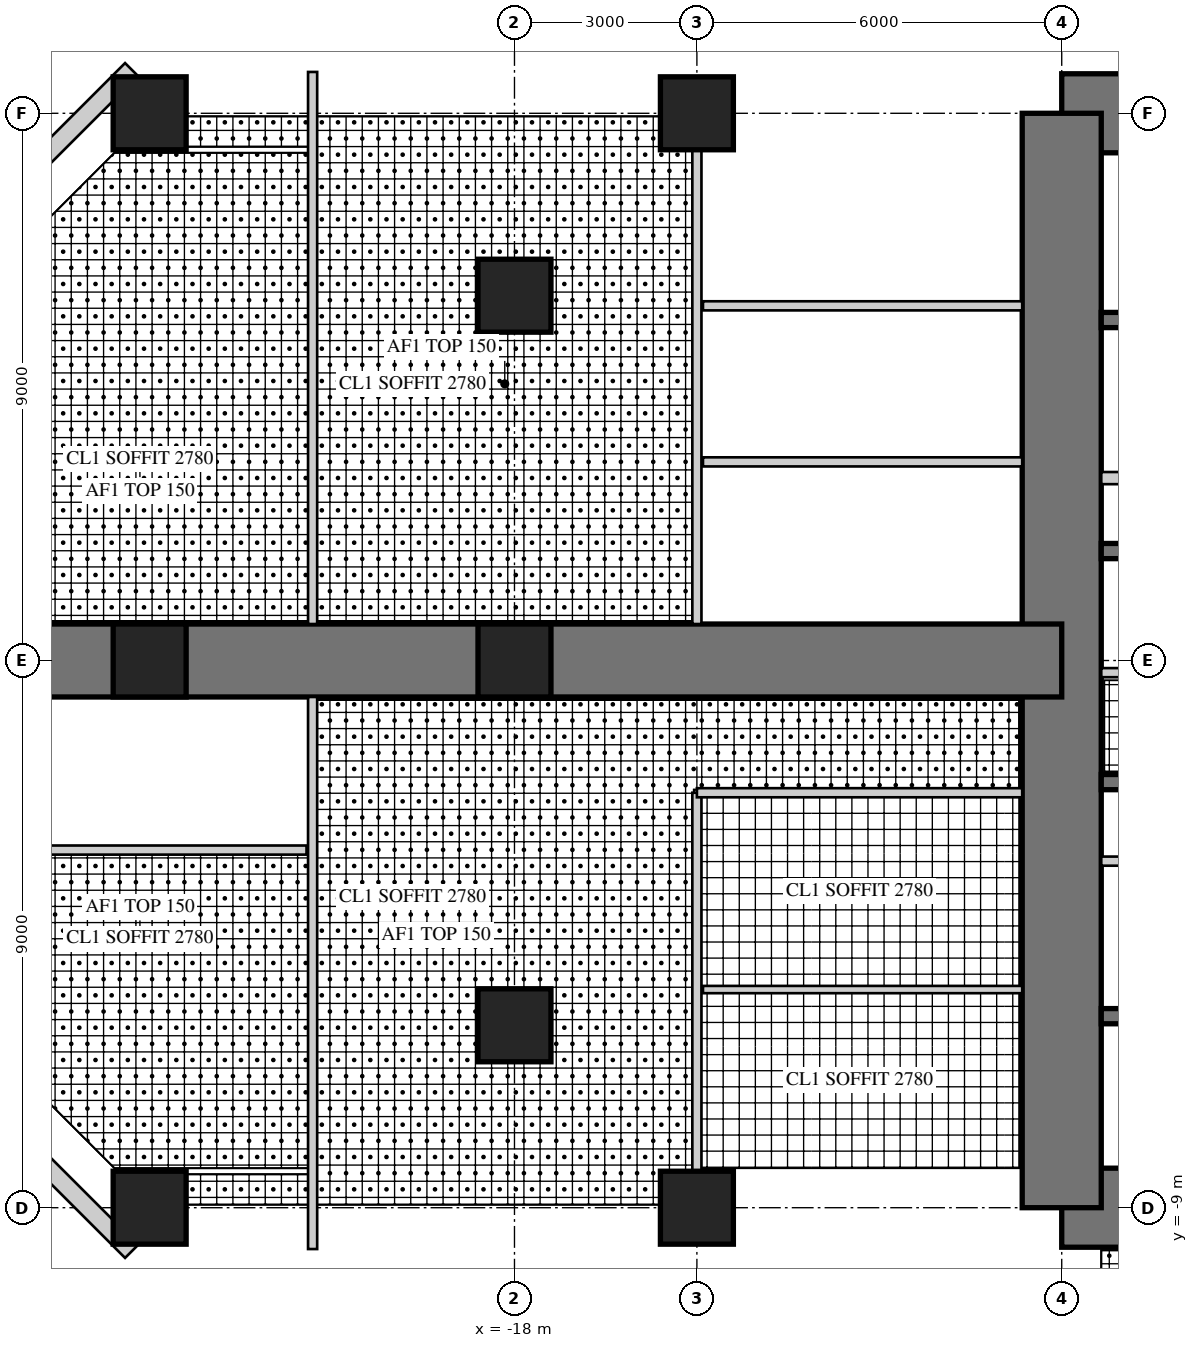
"""IFC4 building model, lengths in metres.
Left out: names, types, materials, properties, quantities, classifications, styles, units other than length and angle.
Written with IfcOpenShell. Run it as: python <this file> out.ifc"""

import sys

from ifc_helpers import new_model, si_unit, direction, frame, frame_2d, origin, origin_2d, place, context, subcontext, project, spatial, rectangle, extrude, element, fill, save


model = new_model("IFC4")
c1 = context("Model", 3, precision=1e-05, world=origin(), true_north=direction((0.0, 1.0)))
c2 = subcontext(c1, "Body", "Model", "MODEL_VIEW")
j1 = project(units=[si_unit("LENGTHUNIT", "METRE"), si_unit("PLANEANGLEUNIT", "RADIAN")], contexts=[c1])
p1 = place(None, origin())
s1 = spatial("IfcSite", under=j1, at=p1, CompositionType="ELEMENT")
p2 = place(p1, origin())
s2 = spatial("IfcBuilding", under=s1, at=p2, CompositionType="ELEMENT")
p3 = place(p2, frame((0.0, 0.0, 47.5)))
s3 = spatial("IfcBuildingStorey", under=s2, at=p3, CompositionType="ELEMENT", Elevation=47.5)
p4 = place(p3, frame((9.0, 9.0, 0.0), z_axis=(0.0, 0.0, 1.0), x_axis=(-1.0, 0.0, 0.0)))
e1 = element("IfcWall", 1, at=p4, inside=s3, PredefinedType="SHEAR", context=c2, shape_type="SweptSolid", body=[
    extrude(rectangle(XDim=18.0, YDim=1.3, at=frame_2d((9.0, 0.0))), origin(), (0.0, 0.0, 1.0), 4.0),
])
p5 = place(p4, frame((9.8, 0.0, 0.0)))
e2 = element("IfcOpeningElement", 2, at=p5, cuts=e1, PredefinedType="OPENING", context=c2, shape_type="SweptSolid", body=[
    extrude(rectangle(XDim=1.0, YDim=2.4, at=frame_2d((0.5, 1.2))), frame((0.0, 0.66, 0.0), z_axis=(0.0, -1.0, 0.0), x_axis=(1.0, 0.0, 0.0)), (0.0, 0.0, 1.0), 1.32),
])
p6 = place(p3, frame((-9.0, -9.0, 0.0), z_axis=(0.0, 0.0, 1.0), x_axis=(1.0, 0.0, 0.0)))
e3 = element("IfcWall", 3, at=p6, inside=s3, PredefinedType="SHEAR", context=c2, shape_type="SweptSolid", body=[
    extrude(rectangle(XDim=18.0, YDim=1.3, at=frame_2d((9.0, 0.0))), origin(), (0.0, 0.0, 1.0), 4.0),
])
p7 = place(p6, frame((9.8, 0.0, 0.0)))
e4 = element("IfcOpeningElement", 4, at=p7, cuts=e3, PredefinedType="OPENING", context=c2, shape_type="SweptSolid", body=[
    extrude(rectangle(XDim=1.0, YDim=2.4, at=frame_2d((0.5, 1.2))), frame((0.0, 0.66, 0.0), z_axis=(0.0, -1.0, 0.0), x_axis=(1.0, 0.0, 0.0)), (0.0, 0.0, 1.0), 1.32),
])
p8 = place(p3, frame((-9.0, 9.0, 0.0), z_axis=(0.0, 0.0, 1.0), x_axis=(0.0, -1.0, 0.0)))
e5 = element("IfcWall", 5, at=p8, inside=s3, PredefinedType="SHEAR", context=c2, shape_type="SweptSolid", body=[
    extrude(rectangle(XDim=18.0, YDim=1.3, at=frame_2d((9.0, 0.0))), origin(), (0.0, 0.0, 1.0), 4.0),
])
p9 = place(p8, frame((9.8, 0.0, 0.0)))
e6 = element("IfcOpeningElement", 6, at=p9, cuts=e5, PredefinedType="OPENING", context=c2, shape_type="SweptSolid", body=[
    extrude(rectangle(XDim=1.0, YDim=2.4, at=frame_2d((0.5, 1.2))), frame((0.0, 0.66, 0.0), z_axis=(0.0, -1.0, 0.0), x_axis=(1.0, 0.0, 0.0)), (0.0, 0.0, 1.0), 1.32),
])
p10 = place(p3, frame((-2.125, 1.8, 0.0), z_axis=(0.0, 0.0, 1.0), x_axis=(-1.0, 0.0, 0.0)))
e7 = element("IfcWall", 7, at=p10, inside=s3, PredefinedType="SHEAR", context=c2, shape_type="SweptSolid", body=[
    extrude(rectangle(XDim=6.225, YDim=0.25, at=frame_2d((3.113, 0.0))), origin(), (0.0, 0.0, 1.0), 4.0),
])
p11 = place(p3, frame((-2.125, 5.6, 0.0), z_axis=(0.0, 0.0, 1.0), x_axis=(-1.0, 0.0, 0.0)))
e8 = element("IfcWall", 8, at=p11, inside=s3, PredefinedType="SHEAR", context=c2, shape_type="SweptSolid", body=[
    extrude(rectangle(XDim=6.225, YDim=0.25, at=frame_2d((3.113, 0.0))), origin(), (0.0, 0.0, 1.0), 4.0),
])
p12 = place(p11, frame((0.175, 0.0, 0.0)))
e9 = element("IfcOpeningElement", 9, at=p12, cuts=e8, PredefinedType="OPENING", context=c2, shape_type="SweptSolid", body=[
    extrude(rectangle(XDim=1.0, YDim=2.1, at=frame_2d((0.5, 1.05))), frame((0.0, 0.135, 0.0), z_axis=(0.0, -1.0, 0.0), x_axis=(1.0, 0.0, 0.0)), (0.0, 0.0, 1.0), 0.27),
])
p13 = place(p3, frame((-5.725, 3.0, 0.0), z_axis=(0.0, 0.0, 1.0), x_axis=(-1.0, 0.0, 0.0)))
e10 = element("IfcWall", 10, at=p13, inside=s3, PredefinedType="PARTITIONING", context=c2, shape_type="SweptSolid", body=[
    extrude(rectangle(XDim=2.625, YDim=0.2, at=frame_2d((1.312, 0.0))), origin(), (0.0, 0.0, 1.0), 4.0),
])
for number, where, z_axis, x_axis in (
    (11, (-1.925, -2.0, 0.0), (0.0, 0.0, 1.0), (-1.0, 0.0, 0.0)),
    (12, (-1.925, -5.85, 0.0), (0.0, 0.0, 1.0), (-1.0, 0.0, 0.0)),
):
    element("IfcWall", number, at=place(p3, frame(where, z_axis=z_axis, x_axis=x_axis)), inside=s3, PredefinedType="SHEAR", context=c2, shape_type="SweptSolid", body=[
        extrude(rectangle(XDim=6.425, YDim=0.25, at=frame_2d((3.212, 0.0))), origin(), (0.0, 0.0, 1.0), 4.0),
    ])
p14 = place(p3, frame((-1.925, -3.3, 0.0), z_axis=(0.0, 0.0, 1.0), x_axis=(-1.0, 0.0, 0.0)))
e13 = element("IfcWall", 13, at=p14, inside=s3, PredefinedType="PARTITIONING", context=c2, shape_type="SweptSolid", body=[
    extrude(rectangle(XDim=6.425, YDim=0.15, at=frame_2d((3.212, 0.0))), origin(), (0.0, 0.0, 1.0), 4.0),
])
p15 = place(p14, frame((0.075, 0.0, 0.0)))
e14 = element("IfcOpeningElement", 14, at=p15, cuts=e13, PredefinedType="OPENING", context=c2, shape_type="SweptSolid", body=[
    extrude(rectangle(XDim=0.8, YDim=2.1, at=frame_2d((0.4, 1.05))), frame((0.0, 0.085, 0.0), z_axis=(0.0, -1.0, 0.0), x_axis=(1.0, 0.0, 0.0)), (0.0, 0.0, 1.0), 0.17),
])
p16 = place(p14, frame((3.675, 0.0, 0.0)))
e15 = element("IfcOpeningElement", 15, at=p16, cuts=e13, PredefinedType="OPENING", context=c2, shape_type="SweptSolid", body=[
    extrude(rectangle(XDim=0.8, YDim=2.1, at=frame_2d((0.4, 1.05))), frame((0.0, 0.085, 0.0), z_axis=(0.0, -1.0, 0.0), x_axis=(1.0, 0.0, 0.0)), (0.0, 0.0, 1.0), 0.17),
])
p17 = place(p3, frame((-9.0, 0.0, 0.0), z_axis=(0.0, 0.0, 1.0), x_axis=(-1.0, 0.0, 0.0)))
e16 = element("IfcWall", 16, at=p17, inside=s3, PredefinedType="SHEAR", context=c2, shape_type="SweptSolid", body=[
    extrude(rectangle(XDim=18.0, YDim=1.2, at=frame_2d((9.0, 0.0))), origin(), (0.0, 0.0, 1.0), 4.0),
])
p18 = place(p17, frame((9.9, 0.0, 0.0)))
e17 = element("IfcOpeningElement", 17, at=p18, cuts=e16, PredefinedType="OPENING", context=c2, shape_type="SweptSolid", body=[
    extrude(rectangle(XDim=1.0, YDim=2.2, at=frame_2d((0.5, 1.1))), frame((0.0, 0.61, 0.0), z_axis=(0.0, -1.0, 0.0), x_axis=(1.0, 0.0, 0.0)), (0.0, 0.0, 1.0), 1.22),
])
for number, where, z_axis, x_axis in (
    (18, (-15.0, 9.0, 0.0), (0.0, 0.0, 1.0), (1.0, 0.0, 0.0)),
    (19, (-24.0, 9.0, 0.0), (0.0, 0.0, 1.0), (1.0, 0.0, 0.0)),
    (20, (-15.0, -9.0, 0.0), (0.0, 0.0, 1.0), (1.0, 0.0, 0.0)),
    (21, (-24.0, -9.0, 0.0), (0.0, 0.0, 1.0), (1.0, 0.0, 0.0)),
    (22, (-18.0, 6.0, 0.0), (0.0, 0.0, 1.0), (1.0, 0.0, 0.0)),
    (23, (-18.0, 0.0, 0.0), (0.0, 0.0, 1.0), (1.0, 0.0, 0.0)),
    (24, (-18.0, -6.0, 0.0), (0.0, 0.0, 1.0), (1.0, 0.0, 0.0)),
    (25, (-24.0, 0.0, 0.0), (0.0, 0.0, 1.0), (1.0, 0.0, 0.0)),
):
    element("IfcColumn", number, at=place(p3, frame(where, z_axis=z_axis, x_axis=x_axis)), inside=s3, PredefinedType="COLUMN", context=c2, shape_type="SweptSolid", body=[
        extrude(rectangle(XDim=1.2, YDim=1.2, at=origin_2d()), origin(), (0.0, 0.0, 1.0), 4.0),
    ])
p19 = place(p3, frame((-24.298, 9.72, 0.0), z_axis=(0.0, 0.0, 1.0), x_axis=(-0.707106781187, -0.707106781187, 0.0)))
e26 = element("IfcWall", 26, at=p19, inside=s3, PredefinedType="SOLIDWALL", context=c2, shape_type="SweptSolid", body=[
    extrude(rectangle(XDim=4.669, YDim=0.3, at=frame_2d((2.335, 0.0))), origin(), (0.0, 0.0, 1.0), 3.8),
])
p20 = place(p19, frame((1.885, 0.0, 0.3)))
e27 = element("IfcOpeningElement", 27, at=p20, cuts=e26, PredefinedType="OPENING", context=c2, shape_type="SweptSolid", body=[
    extrude(rectangle(XDim=0.9, YDim=2.4, at=frame_2d((0.45, 1.2))), frame((0.0, 0.16, 0.0), z_axis=(0.0, -1.0, 0.0), x_axis=(1.0, 0.0, 0.0)), (0.0, 0.0, 1.0), 0.32),
])
p21 = place(p3, frame((-27.6, -6.418, 0.0), z_axis=(0.0, 0.0, 1.0), x_axis=(0.707106781187, -0.707106781187, 0.0)))
e28 = element("IfcWall", 28, at=p21, inside=s3, PredefinedType="SOLIDWALL", context=c2, shape_type="SweptSolid", body=[
    extrude(rectangle(XDim=4.669, YDim=0.3, at=frame_2d((2.335, 0.0))), origin(), (0.0, 0.0, 1.0), 3.8),
])
p22 = place(p21, frame((1.885, 0.0, 0.3)))
e29 = element("IfcOpeningElement", 29, at=p22, cuts=e28, PredefinedType="OPENING", context=c2, shape_type="SweptSolid", body=[
    extrude(rectangle(XDim=0.9, YDim=2.4, at=frame_2d((0.45, 1.2))), frame((0.0, 0.16, 0.0), z_axis=(0.0, -1.0, 0.0), x_axis=(1.0, 0.0, 0.0)), (0.0, 0.0, 1.0), 0.32),
])
p23 = place(p3, frame((-2.325, -0.2, 0.0), z_axis=(0.0, 0.0, 1.0), x_axis=(-1.0, 0.0, 0.0)))
e30 = element("IfcWall", 30, at=p23, inside=s3, PredefinedType="PARTITIONING", context=c2, shape_type="SweptSolid", body=[
    extrude(rectangle(XDim=6.025, YDim=0.15, at=frame_2d((3.013, 0.0))), origin(), (0.0, 0.0, 1.0), 3.8),
])
p24 = place(p23, frame((0.4, 0.0, 0.0)))
e31 = element("IfcOpeningElement", 31, at=p24, cuts=e30, PredefinedType="OPENING", context=c2, shape_type="SweptSolid", body=[
    extrude(rectangle(XDim=1.0, YDim=2.1, at=frame_2d((0.5, 1.05))), frame((0.0, 0.085, 0.0), z_axis=(0.0, -1.0, 0.0), x_axis=(1.0, 0.0, 0.0)), (0.0, 0.0, 1.0), 0.17),
])
p25 = place(p3, frame((-15.0, -2.175, 0.0), z_axis=(0.0, 0.0, 1.0), x_axis=(0.0, -1.0, 0.0)))
e32 = element("IfcWall", 32, at=p25, inside=s3, PredefinedType="PARTITIONING", context=c2, shape_type="SweptSolid", body=[
    extrude(rectangle(XDim=6.225, YDim=0.15, at=frame_2d((3.112, 0.0))), origin(), (0.0, 0.0, 1.0), 2.95),
])
p26 = place(p25, frame((1.118, 0.0, 0.0)))
e33 = element("IfcOpeningElement", 33, at=p26, cuts=e32, PredefinedType="OPENING", context=c2, shape_type="SweptSolid", body=[
    extrude(rectangle(XDim=1.0, YDim=2.1, at=frame_2d((0.5, 1.05))), frame((0.0, 0.085, 0.0), z_axis=(0.0, -1.0, 0.0), x_axis=(1.0, 0.0, 0.0)), (0.0, 0.0, 1.0), 0.17),
])
p27 = place(p25, frame((4.231, 0.0, 0.0)))
e34 = element("IfcOpeningElement", 34, at=p27, cuts=e32, PredefinedType="OPENING", context=c2, shape_type="SweptSolid", body=[
    extrude(rectangle(XDim=1.0, YDim=2.1, at=frame_2d((0.5, 1.05))), frame((0.0, 0.085, 0.0), z_axis=(0.0, -1.0, 0.0), x_axis=(1.0, 0.0, 0.0)), (0.0, 0.0, 1.0), 0.17),
])
p28 = place(p3, frame((-9.65, -2.175, 0.0), z_axis=(0.0, 0.0, 1.0), x_axis=(-1.0, 0.0, 0.0)))
e35 = element("IfcWall", 35, at=p28, inside=s3, PredefinedType="PARTITIONING", context=c2, shape_type="SweptSolid", body=[
    extrude(rectangle(XDim=5.35, YDim=0.15, at=frame_2d((2.675, 0.0))), origin(), (0.0, 0.0, 1.0), 3.8),
])
p29 = place(p3, frame((-9.65, -5.412, 0.0), z_axis=(0.0, 0.0, 1.0), x_axis=(-1.0, 0.0, 0.0)))
e36 = element("IfcWall", 36, at=p29, inside=s3, PredefinedType="PLUMBINGWALL", context=c2, shape_type="SweptSolid", body=[
    extrude(rectangle(XDim=5.25, YDim=0.12, at=frame_2d((2.625, 0.0))), origin(), (0.0, 0.0, 1.0), 3.8),
])
p30 = place(p3, frame((-15.0, 8.4, 0.0), z_axis=(0.0, 0.0, 1.0), x_axis=(0.0, -1.0, 0.0)))
e37 = element("IfcWall", 37, at=p30, inside=s3, PredefinedType="PARTITIONING", context=c2, shape_type="SweptSolid", body=[
    extrude(rectangle(XDim=7.8, YDim=0.15, at=frame_2d((3.9, 0.0))), origin(), (0.0, 0.0, 1.0), 2.95),
])
p31 = place(p30, frame((0.783, 0.0, 0.0)))
e38 = element("IfcOpeningElement", 38, at=p31, cuts=e37, PredefinedType="OPENING", context=c2, shape_type="SweptSolid", body=[
    extrude(rectangle(XDim=1.0, YDim=2.1, at=frame_2d((0.5, 1.05))), frame((0.0, 0.085, 0.0), z_axis=(0.0, -1.0, 0.0), x_axis=(1.0, 0.0, 0.0)), (0.0, 0.0, 1.0), 0.17),
])
p32 = place(p30, frame((3.35, 0.0, 0.0)))
e39 = element("IfcOpeningElement", 39, at=p32, cuts=e37, PredefinedType="OPENING", context=c2, shape_type="SweptSolid", body=[
    extrude(rectangle(XDim=1.0, YDim=2.1, at=frame_2d((0.5, 1.05))), frame((0.0, 0.085, 0.0), z_axis=(0.0, -1.0, 0.0), x_axis=(1.0, 0.0, 0.0)), (0.0, 0.0, 1.0), 0.17),
])
p33 = place(p30, frame((5.967, 0.0, 0.0)))
e40 = element("IfcOpeningElement", 40, at=p33, cuts=e37, PredefinedType="OPENING", context=c2, shape_type="SweptSolid", body=[
    extrude(rectangle(XDim=1.0, YDim=2.1, at=frame_2d((0.5, 1.05))), frame((0.0, 0.085, 0.0), z_axis=(0.0, -1.0, 0.0), x_axis=(1.0, 0.0, 0.0)), (0.0, 0.0, 1.0), 0.17),
])
p34 = place(p3, frame((-9.65, 3.267, 0.0), z_axis=(0.0, 0.0, 1.0), x_axis=(-1.0, 0.0, 0.0)))
e41 = element("IfcWall", 41, at=p34, inside=s3, PredefinedType="PARTITIONING", context=c2, shape_type="SweptSolid", body=[
    extrude(rectangle(XDim=5.25, YDim=0.15, at=frame_2d((2.625, 0.0))), origin(), (0.0, 0.0, 1.0), 3.8),
])
p35 = place(p3, frame((-9.65, 5.833, 0.0), z_axis=(0.0, 0.0, 1.0), x_axis=(-1.0, 0.0, 0.0)))
e42 = element("IfcWall", 42, at=p35, inside=s3, PredefinedType="PARTITIONING", context=c2, shape_type="SweptSolid", body=[
    extrude(rectangle(XDim=5.25, YDim=0.15, at=frame_2d((2.625, 0.0))), origin(), (0.0, 0.0, 1.0), 3.0),
])
p36 = place(p3, frame((-21.42, -3.118, 0.0), z_axis=(0.0, 0.0, 1.0), x_axis=(-1.0, 0.0, 0.0)))
e43 = element("IfcWall", 43, at=p36, inside=s3, PredefinedType="PARTITIONING", context=c2, shape_type="SweptSolid", body=[
    extrude(rectangle(XDim=4.98, YDim=0.15, at=frame_2d((2.49, 0.0))), origin(), (0.0, 0.0, 1.0), 3.8),
])
p37 = place(p3, frame((-21.32, -0.6, 0.0), z_axis=(0.0, 0.0, 1.0), x_axis=(0.0, -1.0, 0.0)))
e44 = element("IfcWall", 44, at=p37, inside=s3, PredefinedType="PARTITIONING", context=c2, shape_type="SweptSolid", body=[
    extrude(rectangle(XDim=9.08, YDim=0.15, at=frame_2d((4.54, 0.0))), origin(), (0.0, 0.0, 1.0), 3.8),
])
p38 = place(p37, frame((0.35, 0.0, 0.0)))
e45 = element("IfcOpeningElement", 45, at=p38, cuts=e44, PredefinedType="OPENING", context=c2, shape_type="SweptSolid", body=[
    extrude(rectangle(XDim=1.0, YDim=2.2, at=frame_2d((0.5, 1.1))), frame((0.0, 0.085, 0.0), z_axis=(0.0, -1.0, 0.0), x_axis=(1.0, 0.0, 0.0)), (0.0, 0.0, 1.0), 0.17),
])
p39 = place(p37, frame((2.993, 0.0, 0.0)))
e46 = element("IfcOpeningElement", 46, at=p39, cuts=e44, PredefinedType="OPENING", context=c2, shape_type="SweptSolid", body=[
    extrude(rectangle(XDim=1.0, YDim=2.2, at=frame_2d((0.5, 1.1))), frame((0.0, 0.085, 0.0), z_axis=(0.0, -1.0, 0.0), x_axis=(1.0, 0.0, 0.0)), (0.0, 0.0, 1.0), 0.17),
])
p40 = place(p3, frame((-21.32, 9.68, 0.0), z_axis=(0.0, 0.0, 1.0), x_axis=(0.0, -1.0, 0.0)))
e47 = element("IfcWall", 47, at=p40, inside=s3, PredefinedType="PARTITIONING", context=c2, shape_type="SweptSolid", body=[
    extrude(rectangle(XDim=9.08, YDim=0.15, at=frame_2d((4.54, 0.0))), origin(), (0.0, 0.0, 1.0), 3.8),
])
p41 = place(p40, frame((7.63, 0.0, 0.0)))
e48 = element("IfcOpeningElement", 48, at=p41, cuts=e47, PredefinedType="OPENING", context=c2, shape_type="SweptSolid", body=[
    extrude(rectangle(XDim=1.0, YDim=2.2, at=frame_2d((0.5, 1.1))), frame((0.0, 0.085, 0.0), z_axis=(0.0, -1.0, 0.0), x_axis=(1.0, 0.0, 0.0)), (0.0, 0.0, 1.0), 0.17),
])
p42 = place(p26, origin())
e49 = element("IfcDoor", 49, at=p42, inside=s3, OperationType="SINGLE_SWING_LEFT", PredefinedType="DOOR", context=c2, shape_type="SweptSolid", body=[
    extrude(rectangle(XDim=1.0, YDim=2.1, at=frame_2d((0.5, 1.05))), frame((0.0, 0.025, 0.0), z_axis=(0.0, -1.0, 0.0), x_axis=(1.0, 0.0, 0.0)), (0.0, 0.0, 1.0), 0.05),
])
fill(e33, e49)
p43 = place(p27, origin())
e50 = element("IfcDoor", 50, at=p43, inside=s3, OperationType="SINGLE_SWING_LEFT", PredefinedType="DOOR", context=c2, shape_type="SweptSolid", body=[
    extrude(rectangle(XDim=1.0, YDim=2.1, at=frame_2d((0.5, 1.05))), frame((0.0, 0.025, 0.0), z_axis=(0.0, -1.0, 0.0), x_axis=(1.0, 0.0, 0.0)), (0.0, 0.0, 1.0), 0.05),
])
fill(e34, e50)
p44 = place(p31, origin())
e51 = element("IfcDoor", 51, at=p44, inside=s3, OperationType="SINGLE_SWING_RIGHT", PredefinedType="DOOR", context=c2, shape_type="SweptSolid", body=[
    extrude(rectangle(XDim=1.0, YDim=2.1, at=frame_2d((0.5, 1.05))), frame((0.0, 0.025, 0.0), z_axis=(0.0, -1.0, 0.0), x_axis=(1.0, 0.0, 0.0)), (0.0, 0.0, 1.0), 0.05),
])
fill(e38, e51)
p45 = place(p32, origin())
e52 = element("IfcDoor", 52, at=p45, inside=s3, OperationType="SINGLE_SWING_LEFT", PredefinedType="DOOR", context=c2, shape_type="SweptSolid", body=[
    extrude(rectangle(XDim=1.0, YDim=2.1, at=frame_2d((0.5, 1.05))), frame((0.0, 0.025, 0.0), z_axis=(0.0, -1.0, 0.0), x_axis=(1.0, 0.0, 0.0)), (0.0, 0.0, 1.0), 0.05),
])
fill(e39, e52)
p46 = place(p33, origin())
e53 = element("IfcDoor", 53, at=p46, inside=s3, OperationType="SINGLE_SWING_LEFT", PredefinedType="DOOR", context=c2, shape_type="SweptSolid", body=[
    extrude(rectangle(XDim=1.0, YDim=2.1, at=frame_2d((0.5, 1.05))), frame((0.0, 0.025, 0.0), z_axis=(0.0, -1.0, 0.0), x_axis=(1.0, 0.0, 0.0)), (0.0, 0.0, 1.0), 0.05),
])
fill(e40, e53)
p47 = place(p38, frame((1.0, 0.0, 0.0), z_axis=(0.0, 0.0, 1.0), x_axis=(-1.0, 0.0, 0.0)))
e54 = element("IfcDoor", 54, at=p47, inside=s3, OperationType="SINGLE_SWING_RIGHT", PredefinedType="DOOR", context=c2, shape_type="SweptSolid", body=[
    extrude(rectangle(XDim=1.0, YDim=2.2, at=frame_2d((0.5, 1.1))), frame((0.0, 0.025, 0.0), z_axis=(0.0, -1.0, 0.0), x_axis=(1.0, 0.0, 0.0)), (0.0, 0.0, 1.0), 0.05),
])
fill(e45, e54)
p48 = place(p39, frame((1.0, 0.0, 0.0), z_axis=(0.0, 0.0, 1.0), x_axis=(-1.0, 0.0, 0.0)))
e55 = element("IfcDoor", 55, at=p48, inside=s3, OperationType="SINGLE_SWING_RIGHT", PredefinedType="DOOR", context=c2, shape_type="SweptSolid", body=[
    extrude(rectangle(XDim=1.0, YDim=2.2, at=frame_2d((0.5, 1.1))), frame((0.0, 0.025, 0.0), z_axis=(0.0, -1.0, 0.0), x_axis=(1.0, 0.0, 0.0)), (0.0, 0.0, 1.0), 0.05),
])
fill(e46, e55)
p49 = place(p41, frame((1.0, 0.0, 0.0), z_axis=(0.0, 0.0, 1.0), x_axis=(-1.0, 0.0, 0.0)))
e56 = element("IfcDoor", 56, at=p49, inside=s3, OperationType="SINGLE_SWING_LEFT", PredefinedType="DOOR", context=c2, shape_type="SweptSolid", body=[
    extrude(rectangle(XDim=1.0, YDim=2.2, at=frame_2d((0.5, 1.1))), frame((0.0, 0.025, 0.0), z_axis=(0.0, -1.0, 0.0), x_axis=(1.0, 0.0, 0.0)), (0.0, 0.0, 1.0), 0.05),
])
fill(e48, e56)
p50 = place(p18, frame((1.0, 0.0, 0.0), z_axis=(0.0, 0.0, 1.0), x_axis=(-1.0, 0.0, 0.0)))
e57 = element("IfcDoor", 57, at=p50, inside=s3, OperationType="SINGLE_SWING_LEFT", PredefinedType="DOOR", context=c2, shape_type="SweptSolid", body=[
    extrude(rectangle(XDim=1.0, YDim=2.2, at=frame_2d((0.5, 1.1))), frame((0.0, 0.025, 0.0), z_axis=(0.0, -1.0, 0.0), x_axis=(1.0, 0.0, 0.0)), (0.0, 0.0, 1.0), 0.05),
])
fill(e17, e57)
p51 = place(p9, frame((1.0, 0.0, 0.0), z_axis=(0.0, 0.0, 1.0), x_axis=(-1.0, 0.0, 0.0)))
e58 = element("IfcDoor", 58, at=p51, inside=s3, OperationType="SINGLE_SWING_RIGHT", PredefinedType="DOOR", context=c2, shape_type="SweptSolid", body=[
    extrude(rectangle(XDim=1.0, YDim=2.4, at=frame_2d((0.5, 1.2))), frame((0.0, -0.005, 0.0), z_axis=(0.0, -1.0, 0.0), x_axis=(1.0, 0.0, 0.0)), (0.0, 0.0, 1.0), 0.05),
])
fill(e6, e58)
save(model, sys.argv[1])
